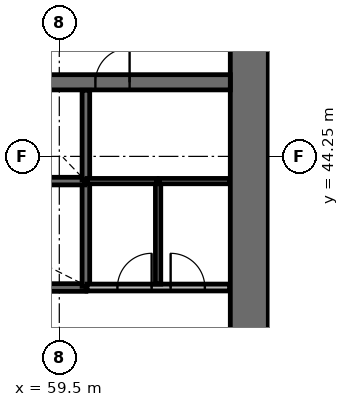
"""IFC4 building model, lengths in metres.
Left out: names, types, materials, properties, quantities, classifications, styles, units other than length and angle.
Written with IfcOpenShell. Run it as: python <this file> out.ifc"""

import sys

from ifc_helpers import new_model, si_unit, direction, frame, frame_2d, origin, place, context, subcontext, project, spatial, rectangle, extrude, source, transform, mapped, element, fill, save


model = new_model("IFC4")
c1 = context("Model", 3, precision=1e-05, world=origin(), true_north=direction((0.0, 1.0)))
c2 = subcontext(c1, "Body", "Model", "MODEL_VIEW")
j1 = project(units=[si_unit("LENGTHUNIT", "METRE"), si_unit("PLANEANGLEUNIT", "RADIAN")], contexts=[c1])
p1 = place(None, origin())
s1 = spatial("IfcSite", under=j1, at=p1, CompositionType="ELEMENT")
p2 = place(p1, origin())
s2 = spatial("IfcBuilding", under=s1, at=p2, CompositionType="ELEMENT")
p3 = place(p2, frame((0.0, 0.0, 9.4)))
s3 = spatial("IfcBuildingStorey", under=s2, at=p3, CompositionType="ELEMENT", Elevation=9.4)
p4 = place(p3, frame((64.5, 38.0, 0.0), z_axis=(0.0, 0.0, 1.0), x_axis=(0.0, 1.0, 0.0)))
e1 = element("IfcWall", 1, at=p4, inside=s3, PredefinedType="SHEAR", context=c2, shape_type="SweptSolid", body=[
    extrude(rectangle(XDim=20.0, YDim=1.0, at=frame_2d((10.0, 0.0))), origin(), (0.0, 0.0, 1.0), 4.4),
])
p5 = place(p4, frame((9.1, 0.0, 0.0)))
e2 = element("IfcOpeningElement", 2, at=p5, cuts=e1, PredefinedType="OPENING", context=c2, shape_type="SweptSolid", body=[
    extrude(rectangle(XDim=1.8, YDim=2.1, at=frame_2d((0.9, 1.05))), frame((0.0, 0.51, 0.0), z_axis=(0.0, -1.0, 0.0), x_axis=(1.0, 0.0, 0.0)), (0.0, 0.0, 1.0), 1.02),
])
p6 = place(p3, frame((40.0, 46.2, 0.0), z_axis=(0.0, 0.0, 1.0), x_axis=(1.0, 0.0, 0.0)))
e3 = element("IfcWall", 3, at=p6, inside=s3, PredefinedType="SHEAR", context=c2, shape_type="SweptSolid", body=[
    extrude(rectangle(XDim=24.0, YDim=0.4, at=frame_2d((12.0, 0.0))), origin(), (0.0, 0.0, 1.0), 4.4),
])
p7 = place(p6, frame((4.5, 0.0, 0.0)))
e4 = element("IfcOpeningElement", 4, at=p7, cuts=e3, PredefinedType="OPENING", context=c2, shape_type="SweptSolid", body=[
    extrude(rectangle(XDim=1.1, YDim=2.1, at=frame_2d((0.55, 1.05))), frame((0.0, 0.21, 0.0), z_axis=(0.0, -1.0, 0.0), x_axis=(1.0, 0.0, 0.0)), (0.0, 0.0, 1.0), 0.42),
])
p8 = place(p6, frame((7.0, 0.0, 0.0)))
e5 = element("IfcOpeningElement", 5, at=p8, cuts=e3, PredefinedType="OPENING", context=c2, shape_type="SweptSolid", body=[
    extrude(rectangle(XDim=1.1, YDim=2.1, at=frame_2d((0.55, 1.05))), frame((0.0, 0.21, 0.0), z_axis=(0.0, -1.0, 0.0), x_axis=(1.0, 0.0, 0.0)), (0.0, 0.0, 1.0), 0.42),
])
p9 = place(p6, frame((9.5, 0.0, 0.0)))
e6 = element("IfcOpeningElement", 6, at=p9, cuts=e3, PredefinedType="OPENING", context=c2, shape_type="SweptSolid", body=[
    extrude(rectangle(XDim=1.1, YDim=2.1, at=frame_2d((0.55, 1.05))), frame((0.0, 0.21, 0.0), z_axis=(0.0, -1.0, 0.0), x_axis=(1.0, 0.0, 0.0)), (0.0, 0.0, 1.0), 0.42),
])
p10 = place(p6, frame((20.45, 0.0, 0.0)))
e7 = element("IfcOpeningElement", 7, at=p10, cuts=e3, PredefinedType="OPENING", context=c2, shape_type="SweptSolid", body=[
    extrude(rectangle(XDim=0.9, YDim=2.1, at=frame_2d((0.45, 1.05))), frame((0.0, 0.21, 0.0), z_axis=(0.0, -1.0, 0.0), x_axis=(1.0, 0.0, 0.0)), (0.0, 0.0, 1.0), 0.42),
])
p11 = place(p6, frame((2.65, 0.0, 0.0)))
e8 = element("IfcOpeningElement", 8, at=p11, cuts=e3, PredefinedType="OPENING", context=c2, shape_type="SweptSolid", body=[
    extrude(rectangle(XDim=0.9, YDim=2.1, at=frame_2d((0.45, 1.05))), frame((0.0, 0.21, 0.0), z_axis=(0.0, -1.0, 0.0), x_axis=(1.0, 0.0, 0.0)), (0.0, 0.0, 1.0), 0.42),
])
p12 = place(p6, frame((11.65, 0.0, 0.0)))
e9 = element("IfcOpeningElement", 9, at=p12, cuts=e3, PredefinedType="OPENING", context=c2, shape_type="SweptSolid", body=[
    extrude(rectangle(XDim=0.9, YDim=2.1, at=frame_2d((0.45, 1.05))), frame((0.0, 0.21, 0.0), z_axis=(0.0, -1.0, 0.0), x_axis=(1.0, 0.0, 0.0)), (0.0, 0.0, 1.0), 0.42),
])
p13 = place(p3, frame((53.6, 40.8, 0.0), z_axis=(0.0, 0.0, 1.0), x_axis=(1.0, 0.0, 0.0)))
e10 = element("IfcWall", 10, at=p13, inside=s3, PredefinedType="SOLIDWALL", context=c2, shape_type="SweptSolid", body=[
    extrude(rectangle(XDim=6.6, YDim=0.2, at=frame_2d((3.3, 0.0))), origin(), (0.0, 0.0, 1.0), 3.95),
])
p14 = place(p13, frame((0.3, 0.0, 0.0)))
e11 = element("IfcOpeningElement", 11, at=p14, cuts=e10, PredefinedType="OPENING", context=c2, shape_type="SweptSolid", body=[
    extrude(rectangle(XDim=1.2, YDim=2.1, at=frame_2d((0.6, 1.05))), frame((0.0, 0.11, 0.0), z_axis=(0.0, -1.0, 0.0), x_axis=(1.0, 0.0, 0.0)), (0.0, 0.0, 1.0), 0.22),
])
p15 = place(p3, frame((60.2, 40.83, 0.0), z_axis=(0.0, 0.0, 1.0), x_axis=(0.0, 1.0, 0.0)))
e12 = element("IfcWall", 12, at=p15, inside=s3, PredefinedType="SOLIDWALL", context=c2, shape_type="SweptSolid", body=[
    extrude(rectangle(XDim=2.77, YDim=0.2, at=frame_2d((1.385, 0.0))), origin(), (0.0, 0.0, 1.0), 3.95),
])
p16 = place(p3, frame((57.73, 43.6, 0.0), z_axis=(0.0, 0.0, 1.0), x_axis=(1.0, 0.0, 0.0)))
e13 = element("IfcWall", 13, at=p16, inside=s3, PredefinedType="SOLIDWALL", context=c2, shape_type="SweptSolid", body=[
    extrude(rectangle(XDim=2.44, YDim=0.2, at=frame_2d((1.22, 0.0))), origin(), (0.0, 0.0, 1.0), 3.95),
])
p17 = place(p3, frame((60.2, 43.63, 0.0), z_axis=(0.0, 0.0, 1.0), x_axis=(0.0, 1.0, 0.0)))
e14 = element("IfcWall", 14, at=p17, inside=s3, PredefinedType="SOLIDWALL", context=c2, shape_type="SweptSolid", body=[
    extrude(rectangle(XDim=2.36, YDim=0.2, at=frame_2d((1.18, 0.0))), origin(), (0.0, 0.0, 1.0), 3.95),
])
p18 = place(p3, frame((60.23, 40.8, 0.0), z_axis=(0.0, 0.0, 1.0), x_axis=(1.0, 0.0, 0.0)))
e15 = element("IfcWall", 15, at=p18, inside=s3, PredefinedType="PARTITIONING", context=c2, shape_type="SweptSolid", body=[
    extrude(rectangle(XDim=3.75, YDim=0.18, at=frame_2d((1.875, 0.0))), origin(), (0.0, 0.0, 1.0), 3.95),
])
p19 = place(p18, frame((0.8, 0.0, 0.0)))
e16 = element("IfcOpeningElement", 16, at=p19, cuts=e15, PredefinedType="OPENING", context=c2, shape_type="SweptSolid", body=[
    extrude(rectangle(XDim=0.9, YDim=2.1, at=frame_2d((0.45, 1.05))), frame((0.0, 0.1, 0.0), z_axis=(0.0, -1.0, 0.0), x_axis=(1.0, 0.0, 0.0)), (0.0, 0.0, 1.0), 0.2),
])
p20 = place(p18, frame((2.2, 0.0, 0.0)))
e17 = element("IfcOpeningElement", 17, at=p20, cuts=e15, PredefinedType="OPENING", context=c2, shape_type="SweptSolid", body=[
    extrude(rectangle(XDim=0.9, YDim=2.1, at=frame_2d((0.45, 1.05))), frame((0.0, 0.1, 0.0), z_axis=(0.0, -1.0, 0.0), x_axis=(1.0, 0.0, 0.0)), (0.0, 0.0, 1.0), 0.2),
])
p21 = place(p3, frame((62.1, 40.89, 0.0), z_axis=(0.0, 0.0, 1.0), x_axis=(0.0, 1.0, 0.0)))
e18 = element("IfcWall", 18, at=p21, inside=s3, PredefinedType="PARTITIONING", context=c2, shape_type="SweptSolid", body=[
    extrude(rectangle(XDim=2.71, YDim=0.14, at=frame_2d((1.355, 0.0))), origin(), (0.0, 0.0, 1.0), 3.15),
])
p22 = place(p3, frame((60.23, 43.6, 0.0), z_axis=(0.0, 0.0, 1.0), x_axis=(1.0, 0.0, 0.0)))
e19 = element("IfcWall", 19, at=p22, inside=s3, PredefinedType="PARTITIONING", context=c2, shape_type="SweptSolid", body=[
    extrude(rectangle(XDim=1.84, YDim=0.14, at=frame_2d((0.92, 0.0))), origin(), (0.0, 0.0, 1.0), 3.15),
])
p23 = place(p3, frame((62.13, 43.6, 0.0), z_axis=(0.0, 0.0, 1.0), x_axis=(1.0, 0.0, 0.0)))
e20 = element("IfcWall", 20, at=p23, inside=s3, PredefinedType="PARTITIONING", context=c2, shape_type="SweptSolid", body=[
    extrude(rectangle(XDim=1.85, YDim=0.14, at=frame_2d((0.925, 0.0))), origin(), (0.0, 0.0, 1.0), 3.15),
])
m1 = source(origin(), c2, "Body", "SweptSolid", [
    extrude(rectangle(XDim=0.9, YDim=2.1, at=frame_2d((0.45, 1.05))), frame((0.0, 0.025, 0.0), z_axis=(0.0, -1.0, 0.0), x_axis=(1.0, 0.0, 0.0)), (0.0, 0.0, 1.0), 0.05),
])
p24 = place(p10, origin())
e21 = element("IfcDoor", 21, at=p24, inside=s3, OperationType="SINGLE_SWING_RIGHT", PredefinedType="DOOR", context=c2, shape_type="MappedRepresentation", body=[
    mapped(m1, transform((0.0, 0.0, 0.0), scale=1.0)),
])
fill(e7, e21)
p25 = place(p19, origin())
e22 = element("IfcDoor", 22, at=p25, inside=s3, OperationType="SINGLE_SWING_RIGHT", PredefinedType="DOOR", context=c2, shape_type="MappedRepresentation", body=[
    mapped(m1, transform((0.0, 0.0, 0.0), scale=1.0)),
])
fill(e16, e22)
p26 = place(p20, origin())
e23 = element("IfcDoor", 23, at=p26, inside=s3, OperationType="SINGLE_SWING_LEFT", PredefinedType="DOOR", context=c2, shape_type="MappedRepresentation", body=[
    mapped(m1, transform((0.0, 0.0, 0.0), scale=1.0)),
])
fill(e17, e23)
save(model, sys.argv[1])
